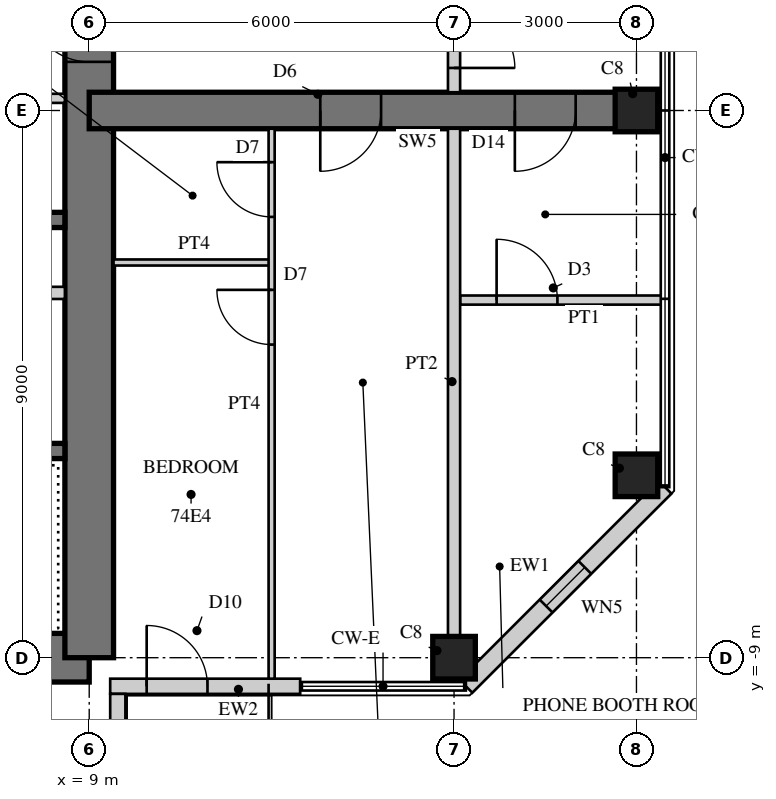
"""IFC4 building model, lengths in metres.
Left out: names, types, materials, properties, quantities, classifications, styles, units other than length and angle.
Written with IfcOpenShell. Run it as: python <this file> out.ifc"""

import sys

from ifc_helpers import new_model, si_unit, direction, frame, frame_2d, origin, origin_2d, place, context, subcontext, project, spatial, rectangle, hollow_rectangle, extrude, element, fill, save


model = new_model("IFC4")
c1 = context("Model", 3, precision=1e-05, world=origin(), true_north=direction((0.0, 1.0)))
c2 = subcontext(c1, "Body", "Model", "MODEL_VIEW")
j1 = project(units=[si_unit("LENGTHUNIT", "METRE"), si_unit("PLANEANGLEUNIT", "RADIAN")], contexts=[c1])
p1 = place(None, origin())
s1 = spatial("IfcSite", under=j1, at=p1, CompositionType="ELEMENT")
p2 = place(p1, origin())
s2 = spatial("IfcBuilding", under=s1, at=p2, CompositionType="ELEMENT")
p3 = place(p2, frame((0.0, 0.0, 284.9)))
s3 = spatial("IfcBuildingStorey", under=s2, at=p3, CompositionType="ELEMENT", Elevation=284.9)
p4 = place(p3, frame((-9.0, -9.0, 0.0), z_axis=(0.0, 0.0, 1.0), x_axis=(1.0, 0.0, 0.0)))
e1 = element("IfcWall", 1, at=p4, inside=s3, PredefinedType="SHEAR", context=c2, shape_type="SweptSolid", body=[
    extrude(rectangle(XDim=18.0, YDim=0.8, at=frame_2d((9.0, 0.0))), origin(), (0.0, 0.0, 1.0), 3.4),
])
p5 = place(p4, frame((9.8, 0.0, 0.0)))
e2 = element("IfcOpeningElement", 2, at=p5, cuts=e1, PredefinedType="OPENING", context=c2, shape_type="SweptSolid", body=[
    extrude(rectangle(XDim=1.0, YDim=2.4, at=frame_2d((0.5, 1.2))), frame((0.0, 0.41, 0.0), z_axis=(0.0, -1.0, 0.0), x_axis=(1.0, 0.0, 0.0)), (0.0, 0.0, 1.0), 0.82),
])
p6 = place(p3, frame((9.0, -9.0, 0.0), z_axis=(0.0, 0.0, 1.0), x_axis=(0.0, 1.0, 0.0)))
e3 = element("IfcWall", 3, at=p6, inside=s3, PredefinedType="SHEAR", context=c2, shape_type="SweptSolid", body=[
    extrude(rectangle(XDim=18.0, YDim=0.8, at=frame_2d((9.0, 0.0))), origin(), (0.0, 0.0, 1.0), 3.4),
])
p7 = place(p6, frame((9.8, 0.0, 0.0)))
e4 = element("IfcOpeningElement", 4, at=p7, cuts=e3, PredefinedType="OPENING", context=c2, shape_type="SweptSolid", body=[
    extrude(rectangle(XDim=1.0, YDim=2.4, at=frame_2d((0.5, 1.2))), frame((0.0, 0.41, 0.0), z_axis=(0.0, -1.0, 0.0), x_axis=(1.0, 0.0, 0.0)), (0.0, 0.0, 1.0), 0.82),
])
p8 = place(p3, frame((2.125, -1.8, 0.0), z_axis=(0.0, 0.0, 1.0), x_axis=(1.0, 0.0, 0.0)))
e5 = element("IfcWall", 5, at=p8, inside=s3, PredefinedType="SHEAR", context=c2, shape_type="SweptSolid", body=[
    extrude(rectangle(XDim=6.475, YDim=0.25, at=frame_2d((3.238, 0.0))), origin(), (0.0, 0.0, 1.0), 3.4),
])
p9 = place(p3, frame((2.125, -5.6, 0.0), z_axis=(0.0, 0.0, 1.0), x_axis=(1.0, 0.0, 0.0)))
e6 = element("IfcWall", 6, at=p9, inside=s3, PredefinedType="SHEAR", context=c2, shape_type="SweptSolid", body=[
    extrude(rectangle(XDim=6.475, YDim=0.25, at=frame_2d((3.238, 0.0))), origin(), (0.0, 0.0, 1.0), 3.4),
])
p10 = place(p9, frame((0.175, 0.0, 0.0)))
e7 = element("IfcOpeningElement", 7, at=p10, cuts=e6, PredefinedType="OPENING", context=c2, shape_type="SweptSolid", body=[
    extrude(rectangle(XDim=1.0, YDim=2.1, at=frame_2d((0.5, 1.05))), frame((0.0, 0.135, 0.0), z_axis=(0.0, -1.0, 0.0), x_axis=(1.0, 0.0, 0.0)), (0.0, 0.0, 1.0), 0.27),
])
p11 = place(p3, frame((5.725, -3.0, 0.0), z_axis=(0.0, 0.0, 1.0), x_axis=(1.0, 0.0, 0.0)))
e8 = element("IfcWall", 8, at=p11, inside=s3, PredefinedType="PARTITIONING", context=c2, shape_type="SweptSolid", body=[
    extrude(rectangle(XDim=2.875, YDim=0.2, at=frame_2d((1.438, 0.0))), origin(), (0.0, 0.0, 1.0), 3.4),
])
p12 = place(p3, frame((9.0, 0.0, 0.0), z_axis=(0.0, 0.0, 1.0), x_axis=(1.0, 0.0, 0.0)))
e9 = element("IfcWall", 9, at=p12, inside=s3, PredefinedType="SHEAR", context=c2, shape_type="SweptSolid", body=[
    extrude(rectangle(XDim=9.0, YDim=0.6, at=frame_2d((4.5, 0.0))), origin(), (0.0, 0.0, 1.0), 3.4),
])
p13 = place(p12, frame((3.8, 0.0, 0.0)))
e10 = element("IfcOpeningElement", 10, at=p13, cuts=e9, PredefinedType="OPENING", context=c2, shape_type="SweptSolid", body=[
    extrude(rectangle(XDim=1.0, YDim=2.15, at=frame_2d((0.5, 1.075))), frame((0.0, 0.31, 0.0), z_axis=(0.0, -1.0, 0.0), x_axis=(1.0, 0.0, 0.0)), (0.0, 0.0, 1.0), 0.62),
])
p14 = place(p12, frame((7.0, 0.0, 0.0)))
e11 = element("IfcOpeningElement", 11, at=p14, cuts=e9, PredefinedType="OPENING", context=c2, shape_type="SweptSolid", body=[
    extrude(rectangle(XDim=1.0, YDim=2.2, at=frame_2d((0.5, 1.1))), frame((0.0, 0.31, 0.0), z_axis=(0.0, -1.0, 0.0), x_axis=(1.0, 0.0, 0.0)), (0.0, 0.0, 1.0), 0.62),
])
for number, where, z_axis, x_axis in (
    (12, (15.0, -9.0, 0.0), (0.0, 0.0, 1.0), (1.0, 0.0, 0.0)),
    (13, (18.0, -6.0, 0.0), (0.0, 0.0, 1.0), (1.0, 0.0, 0.0)),
    (14, (18.0, 0.0, 0.0), (0.0, 0.0, 1.0), (1.0, 0.0, 0.0)),
):
    element("IfcColumn", number, at=place(p3, frame(where, z_axis=z_axis, x_axis=x_axis)), inside=s3, PredefinedType="COLUMN", context=c2, shape_type="SweptSolid", body=[
        extrude(rectangle(XDim=0.7, YDim=0.7, at=origin_2d()), origin(), (0.0, 0.0, 1.0), 3.4),
    ])
p15 = place(p3, frame((9.345, -9.47, 0.0), z_axis=(0.0, 0.0, 1.0), x_axis=(1.0, 0.0, 0.0)))
e15 = element("IfcWall", 15, at=p15, inside=s3, PredefinedType="SOLIDWALL", context=c2, shape_type="SweptSolid", body=[
    extrude(rectangle(XDim=3.125, YDim=0.25, at=frame_2d((1.562, 0.0))), origin(), (0.0, 0.0, 1.0), 3.2),
])
p16 = place(p15, frame((0.6, 0.0, 0.0)))
e16 = element("IfcOpeningElement", 16, at=p16, cuts=e15, PredefinedType="OPENING", context=c2, shape_type="SweptSolid", body=[
    extrude(rectangle(XDim=1.0, YDim=2.2, at=frame_2d((0.5, 1.1))), frame((0.0, 0.135, 0.0), z_axis=(0.0, -1.0, 0.0), x_axis=(1.0, 0.0, 0.0)), (0.0, 0.0, 1.0), 0.27),
])
p17 = place(p3, frame((15.195, -9.47, 0.0), z_axis=(0.0, 0.0, 1.0), x_axis=(0.707106781187, 0.707106781187, 0.0)))
e17 = element("IfcWall", 17, at=p17, inside=s3, PredefinedType="SOLIDWALL", context=c2, shape_type="SweptSolid", body=[
    extrude(rectangle(XDim=4.632, YDim=0.3, at=frame_2d((2.316, 0.0))), origin(), (0.0, 0.0, 1.0), 3.2),
])
p18 = place(p17, frame((1.866, 0.0, 0.3)))
e18 = element("IfcOpeningElement", 18, at=p18, cuts=e17, PredefinedType="OPENING", context=c2, shape_type="SweptSolid", body=[
    extrude(rectangle(XDim=0.9, YDim=2.4, at=frame_2d((0.45, 1.2))), frame((0.0, 0.16, 0.0), z_axis=(0.0, -1.0, 0.0), x_axis=(1.0, 0.0, 0.0)), (0.0, 0.0, 1.0), 0.32),
])
p19 = place(p3, frame((9.47, -12.47, 0.0), z_axis=(0.0, 0.0, 1.0), x_axis=(0.0, 1.0, 0.0)))
e19 = element("IfcWall", 19, at=p19, inside=s3, PredefinedType="SOLIDWALL", context=c2, shape_type="SweptSolid", body=[
    extrude(rectangle(XDim=2.875, YDim=0.25, at=frame_2d((1.438, 0.0))), origin(), (0.0, 0.0, 1.0), 3.2),
])
p20 = place(p19, frame((0.6, 0.0, 0.0)))
e20 = element("IfcOpeningElement", 20, at=p20, cuts=e19, PredefinedType="OPENING", context=c2, shape_type="SweptSolid", body=[
    extrude(rectangle(XDim=1.0, YDim=2.2, at=frame_2d((0.5, 1.1))), frame((0.0, 0.135, 0.0), z_axis=(0.0, -1.0, 0.0), x_axis=(1.0, 0.0, 0.0)), (0.0, 0.0, 1.0), 0.27),
])
p21 = place(p3, frame((2.325, 0.2, 0.0), z_axis=(0.0, 0.0, 1.0), x_axis=(1.0, 0.0, 0.0)))
e21 = element("IfcWall", 21, at=p21, inside=s3, PredefinedType="PARTITIONING", context=c2, shape_type="SweptSolid", body=[
    extrude(rectangle(XDim=6.275, YDim=0.15, at=frame_2d((3.138, 0.0))), origin(), (0.0, 0.0, 1.0), 3.2),
])
p22 = place(p21, frame((0.4, 0.0, 0.0)))
e22 = element("IfcOpeningElement", 22, at=p22, cuts=e21, PredefinedType="OPENING", context=c2, shape_type="SweptSolid", body=[
    extrude(rectangle(XDim=1.0, YDim=2.1, at=frame_2d((0.5, 1.05))), frame((0.0, 0.085, 0.0), z_axis=(0.0, -1.0, 0.0), x_axis=(1.0, 0.0, 0.0)), (0.0, 0.0, 1.0), 0.17),
])
p23 = place(p3, frame((9.4, -2.5, 0.0), z_axis=(0.0, 0.0, 1.0), x_axis=(1.0, 0.0, 0.0)))
e23 = element("IfcWall", 23, at=p23, inside=s3, PredefinedType="PARTITIONING", context=c2, shape_type="SweptSolid", body=[
    extrude(rectangle(XDim=2.65, YDim=0.1, at=frame_2d((1.325, 0.0))), origin(), (0.0, 0.0, 1.0), 3.2),
])
p24 = place(p3, frame((12.0, -9.345, 0.0), z_axis=(0.0, 0.0, 1.0), x_axis=(0.0, 1.0, 0.0)))
e24 = element("IfcWall", 24, at=p24, inside=s3, PredefinedType="PARTITIONING", context=c2, shape_type="SweptSolid", body=[
    extrude(rectangle(XDim=9.045, YDim=0.1, at=frame_2d((4.522, 0.0))), origin(), (0.0, 0.0, 1.0), 3.2),
])
p25 = place(p24, frame((5.495, 0.0, 0.0)))
e25 = element("IfcOpeningElement", 25, at=p25, cuts=e24, PredefinedType="OPENING", context=c2, shape_type="SweptSolid", body=[
    extrude(rectangle(XDim=0.9, YDim=2.1, at=frame_2d((0.45, 1.05))), frame((0.0, 0.06, 0.0), z_axis=(0.0, -1.0, 0.0), x_axis=(1.0, 0.0, 0.0)), (0.0, 0.0, 1.0), 0.12),
])
p26 = place(p24, frame((7.595, 0.0, 0.0)))
e26 = element("IfcOpeningElement", 26, at=p26, cuts=e24, PredefinedType="OPENING", context=c2, shape_type="SweptSolid", body=[
    extrude(rectangle(XDim=0.9, YDim=2.1, at=frame_2d((0.45, 1.05))), frame((0.0, 0.06, 0.0), z_axis=(0.0, -1.0, 0.0), x_axis=(1.0, 0.0, 0.0)), (0.0, 0.0, 1.0), 0.12),
])
p27 = place(p3, frame((15.1, -3.118, 0.0), z_axis=(0.0, 0.0, 1.0), x_axis=(1.0, 0.0, 0.0)))
e27 = element("IfcWall", 27, at=p27, inside=s3, PredefinedType="PARTITIONING", context=c2, shape_type="SweptSolid", body=[
    extrude(rectangle(XDim=3.33, YDim=0.15, at=frame_2d((1.665, 0.0))), origin(), (0.0, 0.0, 1.0), 3.2),
])
p28 = place(p27, frame((0.6, 0.0, 0.0)))
e28 = element("IfcOpeningElement", 28, at=p28, cuts=e27, PredefinedType="OPENING", context=c2, shape_type="SweptSolid", body=[
    extrude(rectangle(XDim=1.0, YDim=2.1, at=frame_2d((0.5, 1.05))), frame((0.0, 0.085, 0.0), z_axis=(0.0, -1.0, 0.0), x_axis=(1.0, 0.0, 0.0)), (0.0, 0.0, 1.0), 0.17),
])
p29 = place(p3, frame((15.0, -8.65, 0.0), z_axis=(0.0, 0.0, 1.0), x_axis=(0.0, 1.0, 0.0)))
e29 = element("IfcWall", 29, at=p29, inside=s3, PredefinedType="SOLIDWALL", context=c2, shape_type="SweptSolid", body=[
    extrude(rectangle(XDim=8.35, YDim=0.2, at=frame_2d((4.175, 0.0))), origin(), (0.0, 0.0, 1.0), 2.5),
])
p30 = place(p3, frame((15.0, 0.3, 0.0), z_axis=(0.0, 0.0, 1.0), x_axis=(0.0, 1.0, 0.0)))
e30 = element("IfcWall", 30, at=p30, inside=s3, PredefinedType="SOLIDWALL", context=c2, shape_type="SweptSolid", body=[
    extrude(rectangle(XDim=8.35, YDim=0.2, at=frame_2d((4.175, 0.0))), origin(), (0.0, 0.0, 1.0), 2.5),
])
p31 = place(p30, frame((0.4, 0.0, 0.0)))
e31 = element("IfcOpeningElement", 31, at=p31, cuts=e30, PredefinedType="OPENING", context=c2, shape_type="SweptSolid", body=[
    extrude(rectangle(XDim=1.0, YDim=2.2, at=frame_2d((0.5, 1.1))), frame((0.0, 0.11, 0.0), z_axis=(0.0, -1.0, 0.0), x_axis=(1.0, 0.0, 0.0)), (0.0, 0.0, 1.0), 0.22),
])
p32 = place(p16, origin())
e32 = element("IfcDoor", 32, at=p32, inside=s3, OperationType="SINGLE_SWING_LEFT", PredefinedType="DOOR", context=c2, shape_type="SweptSolid", body=[
    extrude(hollow_rectangle(XDim=1.0, YDim=2.2, WallThickness=0.06, at=frame_2d((0.5, 1.1))), frame((0.0, 0.025, 0.0), z_axis=(0.0, -1.0, 0.0), x_axis=(1.0, 0.0, 0.0)), (0.0, 0.0, 1.0), 0.05),
    extrude(rectangle(XDim=0.879, YDim=2.079, at=frame_2d((0.5, 1.1))), frame((0.0, 0.025, 0.0), z_axis=(0.0, -1.0, 0.0), x_axis=(1.0, 0.0, 0.0)), (0.0, 0.0, 1.0), 0.05),
])
fill(e16, e32)
p33 = place(p18, origin())
e33 = element("IfcWindow", 33, at=p33, inside=s3, PartitioningType="SINGLE_PANEL", PredefinedType="WINDOW", context=c2, shape_type="SweptSolid", body=[
    extrude(hollow_rectangle(XDim=0.9, YDim=2.4, WallThickness=0.06, at=frame_2d((0.45, 1.2))), frame((0.0, 0.03, 0.0), z_axis=(0.0, -1.0, 0.0), x_axis=(1.0, 0.0, 0.0)), (0.0, 0.0, 1.0), 0.06),
    extrude(rectangle(XDim=0.779, YDim=2.279, at=frame_2d((0.45, 1.2))), frame((0.0, 0.03, 0.0), z_axis=(0.0, -1.0, 0.0), x_axis=(1.0, 0.0, 0.0)), (0.0, 0.0, 1.0), 0.06),
])
fill(e18, e33)
p34 = place(p25, origin())
e34 = element("IfcDoor", 34, at=p34, inside=s3, OperationType="SINGLE_SWING_RIGHT", PredefinedType="DOOR", context=c2, shape_type="SweptSolid", body=[
    extrude(rectangle(XDim=0.9, YDim=2.1, at=frame_2d((0.45, 1.05))), frame((0.0, 0.025, 0.0), z_axis=(0.0, -1.0, 0.0), x_axis=(1.0, 0.0, 0.0)), (0.0, 0.0, 1.0), 0.05),
])
fill(e25, e34)
p35 = place(p26, origin())
e35 = element("IfcDoor", 35, at=p35, inside=s3, OperationType="SINGLE_SWING_RIGHT", PredefinedType="DOOR", context=c2, shape_type="SweptSolid", body=[
    extrude(rectangle(XDim=0.9, YDim=2.1, at=frame_2d((0.45, 1.05))), frame((0.0, 0.025, 0.0), z_axis=(0.0, -1.0, 0.0), x_axis=(1.0, 0.0, 0.0)), (0.0, 0.0, 1.0), 0.05),
])
fill(e26, e35)
p36 = place(p28, origin())
e36 = element("IfcDoor", 36, at=p36, inside=s3, OperationType="SINGLE_SWING_LEFT", PredefinedType="DOOR", context=c2, shape_type="SweptSolid", body=[
    extrude(rectangle(XDim=1.0, YDim=2.1, at=frame_2d((0.5, 1.05))), frame((0.0, 0.025, 0.0), z_axis=(0.0, -1.0, 0.0), x_axis=(1.0, 0.0, 0.0)), (0.0, 0.0, 1.0), 0.05),
])
fill(e28, e36)
p37 = place(p31, frame((1.0, 0.0, 0.0), z_axis=(0.0, 0.0, 1.0), x_axis=(-1.0, 0.0, 0.0)))
e37 = element("IfcDoor", 37, at=p37, inside=s3, OperationType="SINGLE_SWING_RIGHT", PredefinedType="DOOR", context=c2, shape_type="SweptSolid", body=[
    extrude(rectangle(XDim=1.0, YDim=2.2, at=frame_2d((0.5, 1.1))), frame((0.0, 0.025, 0.0), z_axis=(0.0, -1.0, 0.0), x_axis=(1.0, 0.0, 0.0)), (0.0, 0.0, 1.0), 0.05),
])
fill(e31, e37)
p38 = place(p13, frame((1.0, 0.0, 0.0), z_axis=(0.0, 0.0, 1.0), x_axis=(-1.0, 0.0, 0.0)))
e38 = element("IfcDoor", 38, at=p38, inside=s3, OperationType="SINGLE_SWING_RIGHT", PredefinedType="DOOR", context=c2, shape_type="SweptSolid", body=[
    extrude(rectangle(XDim=1.0, YDim=2.15, at=frame_2d((0.5, 1.075))), frame((0.0, 0.025, 0.0), z_axis=(0.0, -1.0, 0.0), x_axis=(1.0, 0.0, 0.0)), (0.0, 0.0, 1.0), 0.05),
])
fill(e10, e38)
p39 = place(p14, frame((1.0, 0.0, 0.0), z_axis=(0.0, 0.0, 1.0), x_axis=(-1.0, 0.0, 0.0)))
e39 = element("IfcDoor", 39, at=p39, inside=s3, OperationType="SINGLE_SWING_RIGHT", PredefinedType="DOOR", context=c2, shape_type="SweptSolid", body=[
    extrude(rectangle(XDim=1.0, YDim=2.2, at=frame_2d((0.5, 1.1))), frame((0.0, 0.025, 0.0), z_axis=(0.0, -1.0, 0.0), x_axis=(1.0, 0.0, 0.0)), (0.0, 0.0, 1.0), 0.05),
])
fill(e11, e39)
p40 = place(p7, origin())
e40 = element("IfcDoor", 40, at=p40, inside=s3, OperationType="SINGLE_SWING_RIGHT", PredefinedType="DOOR", context=c2, shape_type="SweptSolid", body=[
    extrude(rectangle(XDim=1.0, YDim=2.4, at=frame_2d((0.5, 1.2))), frame((0.0, 0.055, 0.0), z_axis=(0.0, -1.0, 0.0), x_axis=(1.0, 0.0, 0.0)), (0.0, 0.0, 1.0), 0.05),
])
fill(e4, e40)
save(model, sys.argv[1])
